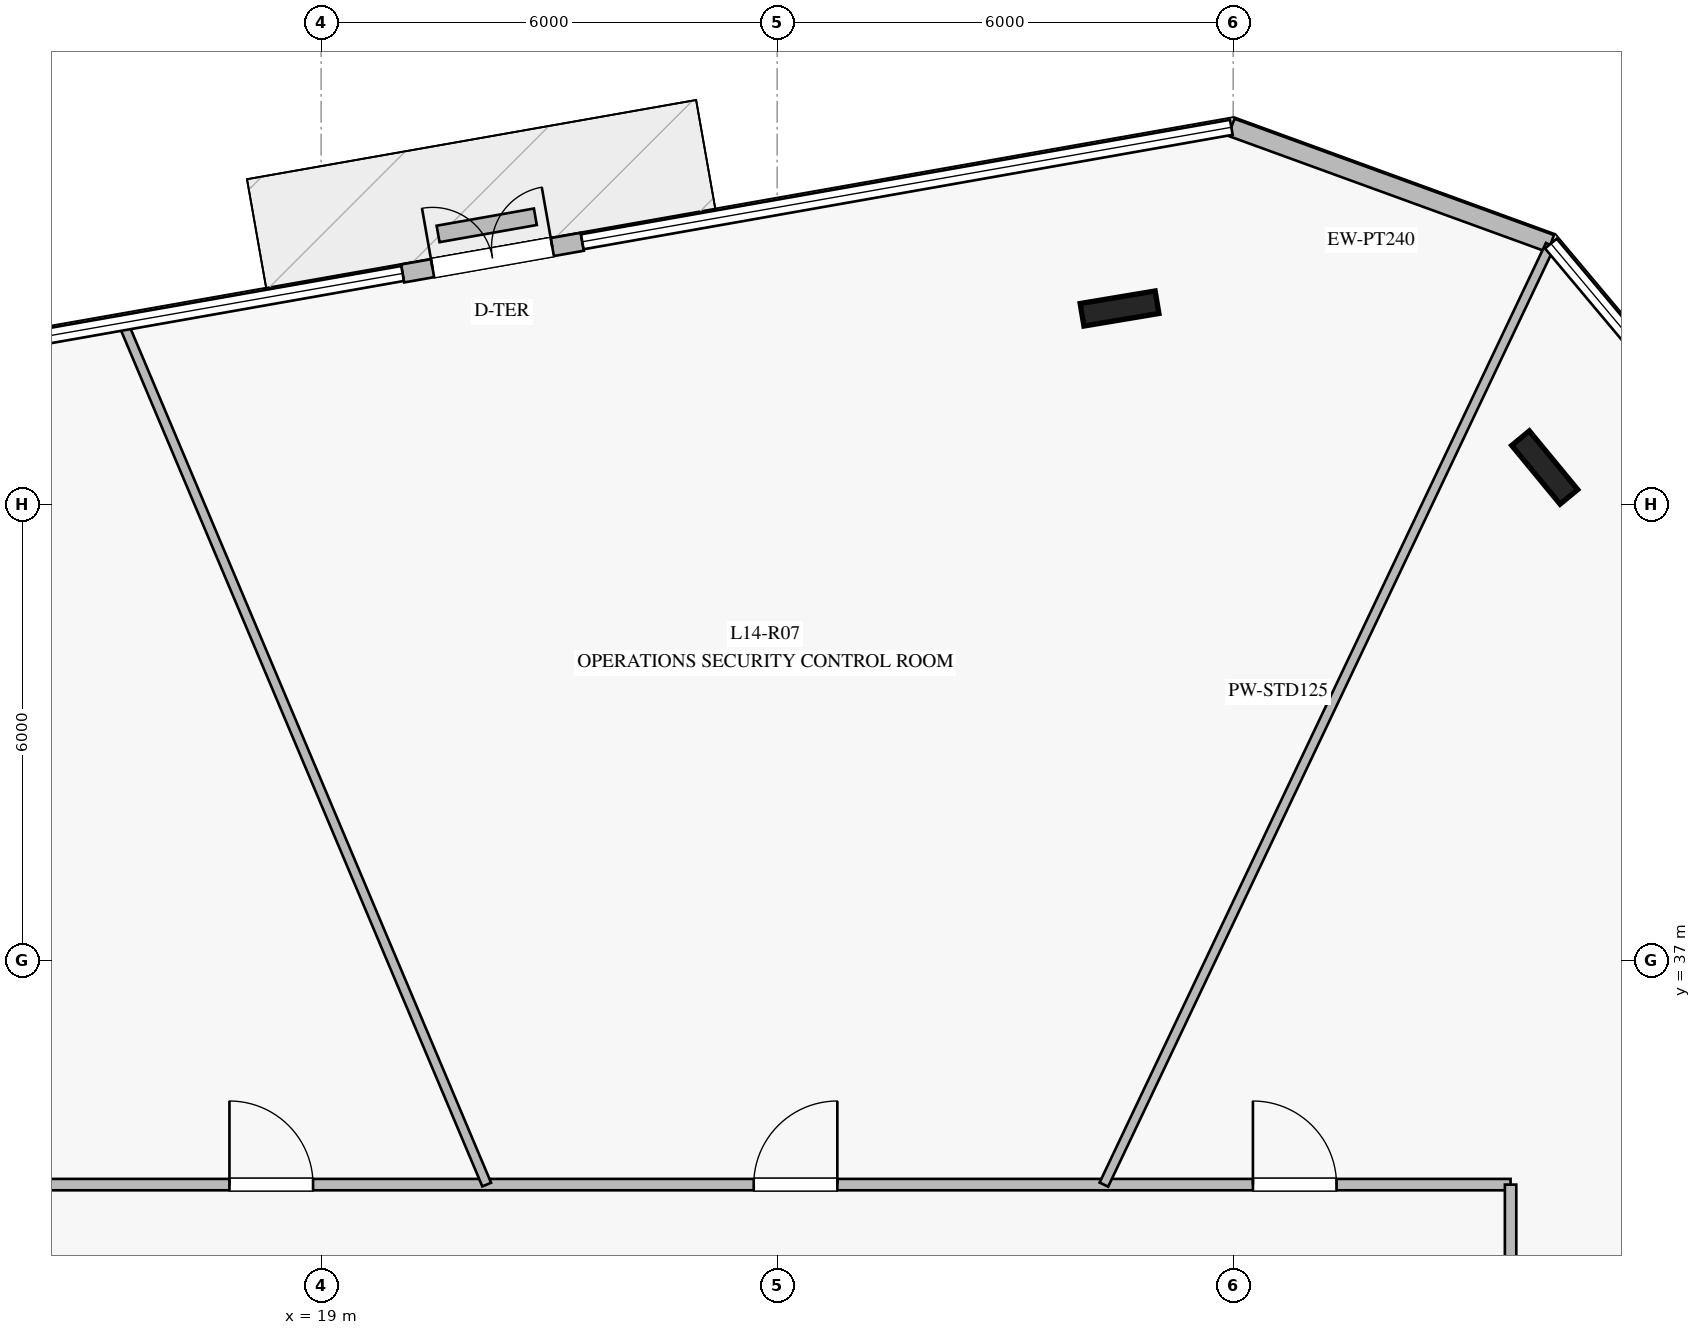
"""IFC4 building model, lengths in metres.
Left out: names, types, materials, properties, quantities, classifications, styles, units other than length and angle.
Written with IfcOpenShell. Run it as: python <this file> out.ifc"""

import sys

from ifc_helpers import new_model, si_unit, direction, frame, frame_2d, origin, origin_2d, place, context, subcontext, project, spatial, rectangle, i_section, extrude, element, fill, save


model = new_model("IFC4")
c1 = context("Model", 3, precision=1e-05, world=origin(), true_north=direction((0.0, 1.0)))
c2 = subcontext(c1, "Body", "Model", "MODEL_VIEW")
j1 = project(units=[si_unit("LENGTHUNIT", "METRE"), si_unit("PLANEANGLEUNIT", "RADIAN")], contexts=[c1])
p1 = place(None, origin())
s1 = spatial("IfcSite", under=j1, at=p1, CompositionType="ELEMENT")
p2 = place(p1, origin())
s2 = spatial("IfcBuilding", under=s1, at=p2, CompositionType="ELEMENT")
p3 = place(p2, frame((0.0, 0.0, 60.0)))
s3 = spatial("IfcBuildingStorey", under=s2, at=p3, CompositionType="ELEMENT", Elevation=60.0)
for number, where, z_axis, x_axis in (
    (1, (35.099, 43.484, 0.0), (0.0, 0.0, 1.0), (-0.636, 0.772, 0.0)),
    (2, (29.505, 45.576, 0.0), (0.0, 0.0, 1.0), (0.986, 0.165, 0.0)),
):
    element("IfcColumn", number, at=place(p3, frame(where, z_axis=z_axis, x_axis=x_axis)), inside=s3, PredefinedType="COLUMN", context=c2, shape_type="SweptSolid", body=[
        extrude(i_section(OverallWidth=0.3, OverallDepth=1.0, WebThickness=0.019, FlangeThickness=0.036, at=origin_2d()), origin(), (0.0, 0.0, 1.0), 4.0),
    ])
p4 = place(p3, frame((35.18, 46.43, 0.0), z_axis=(0.0, 0.0, 1.0), x_axis=(-0.939696189387, 0.342010338515, 0.0)))
e3 = element("IfcWall", 3, at=p4, inside=s3, PredefinedType="STANDARD", context=c2, shape_type="SweptSolid", body=[
    extrude(rectangle(XDim=4.474, YDim=0.24, at=frame_2d((2.237, 0.0))), origin(), (0.0, 0.0, 1.0), 3.76),
])
p5 = place(p3, frame((22.436, 46.454, 0.0), z_axis=(0.0, 0.0, 1.0), x_axis=(-0.984796866145, -0.173709908848, 0.0)))
e4 = element("IfcWall", 4, at=p5, inside=s3, PredefinedType="STANDARD", context=c2, shape_type="SweptSolid", body=[
    extrude(rectangle(XDim=2.4, YDim=0.24, at=frame_2d((1.2, 0.0))), origin(), (0.0, 0.0, 1.0), 3.76),
])
p6 = place(p5, frame((0.4, 0.0, 0.0)))
e5 = element("IfcOpeningElement", 5, at=p6, cuts=e4, PredefinedType="OPENING", context=c2, shape_type="SweptSolid", body=[
    extrude(rectangle(XDim=1.6, YDim=2.25, at=frame_2d((0.8, 1.125))), frame((0.0, 0.13, 0.0), z_axis=(0.0, -1.0, 0.0), x_axis=(1.0, 0.0, 0.0)), (0.0, 0.0, 1.0), 0.26),
])
p7 = place(p3, frame((21.819, 46.783, 0.0), z_axis=(0.0, 0.0, 1.0), x_axis=(-0.98475896803, -0.173924624146, 0.0)))
e6 = element("IfcWall", 6, at=p7, inside=s3, PredefinedType="USERDEFINED", context=c2, shape_type="SweptSolid", body=[
    extrude(rectangle(XDim=1.3, YDim=0.22, at=frame_2d((0.65, 0.0))), origin(), (0.0, 0.0, 1.0), 0.4),
])
p8 = place(p3, frame((15.35, 34.05, 0.0), z_axis=(0.0, 0.0, 1.0), x_axis=(1.0, 0.0, 0.0)))
e7 = element("IfcWall", 7, at=p8, inside=s3, PredefinedType="PARTITIONING", context=c2, shape_type="SweptSolid", body=[
    extrude(rectangle(XDim=19.3, YDim=0.15, at=frame_2d((9.65, 0.0))), origin(), (0.0, 0.0, 1.0), 3.21),
])
p9 = place(p8, frame((15.91, 0.0, 0.0)))
e8 = element("IfcOpeningElement", 8, at=p9, cuts=e7, PredefinedType="OPENING", context=c2, shape_type="SweptSolid", body=[
    extrude(rectangle(XDim=1.1, YDim=2.2, at=frame_2d((0.55, 1.1))), frame((0.0, 0.085, 0.0), z_axis=(0.0, -1.0, 0.0), x_axis=(1.0, 0.0, 0.0)), (0.0, 0.0, 1.0), 0.17),
])
p10 = place(p8, frame((9.342, 0.0, 0.0)))
e9 = element("IfcOpeningElement", 9, at=p10, cuts=e7, PredefinedType="OPENING", context=c2, shape_type="SweptSolid", body=[
    extrude(rectangle(XDim=1.1, YDim=2.2, at=frame_2d((0.55, 1.1))), frame((0.0, 0.085, 0.0), z_axis=(0.0, -1.0, 0.0), x_axis=(1.0, 0.0, 0.0)), (0.0, 0.0, 1.0), 0.17),
])
p11 = place(p8, frame((2.444, 0.0, 0.0)))
e10 = element("IfcOpeningElement", 10, at=p11, cuts=e7, PredefinedType="OPENING", context=c2, shape_type="SweptSolid", body=[
    extrude(rectangle(XDim=1.1, YDim=2.2, at=frame_2d((0.55, 1.1))), frame((0.0, 0.085, 0.0), z_axis=(0.0, -1.0, 0.0), x_axis=(1.0, 0.0, 0.0)), (0.0, 0.0, 1.0), 0.17),
])
p12 = place(p3, frame((34.65, 34.05, 0.0), z_axis=(0.0, 0.0, 1.0), x_axis=(0.0, -1.0, 0.0)))
e11 = element("IfcWall", 11, at=p12, inside=s3, PredefinedType="PARTITIONING", context=c2, shape_type="SweptSolid", body=[
    extrude(rectangle(XDim=18.1, YDim=0.15, at=frame_2d((9.05, 0.0))), origin(), (0.0, 0.0, 1.0), 3.21),
])
p13 = place(p12, frame((15.415, 0.0, 0.0)))
e12 = element("IfcOpeningElement", 12, at=p13, cuts=e11, PredefinedType="OPENING", context=c2, shape_type="SweptSolid", body=[
    extrude(rectangle(XDim=1.1, YDim=2.2, at=frame_2d((0.55, 1.1))), frame((0.0, 0.085, 0.0), z_axis=(0.0, -1.0, 0.0), x_axis=(1.0, 0.0, 0.0)), (0.0, 0.0, 1.0), 0.17),
])
p14 = place(p12, frame((9.732, 0.0, 0.0)))
e13 = element("IfcOpeningElement", 13, at=p14, cuts=e11, PredefinedType="OPENING", context=c2, shape_type="SweptSolid", body=[
    extrude(rectangle(XDim=1.1, YDim=2.2, at=frame_2d((0.55, 1.1))), frame((0.0, 0.085, 0.0), z_axis=(0.0, -1.0, 0.0), x_axis=(1.0, 0.0, 0.0)), (0.0, 0.0, 1.0), 0.17),
])
p15 = place(p3, frame((29.299, 34.05, 0.0), z_axis=(0.0, 0.0, 1.0), x_axis=(0.429120489577, 0.903247255974, 0.0)))
e14 = element("IfcWall", 14, at=p15, inside=s3, PredefinedType="PARTITIONING", context=c2, shape_type="SweptSolid", body=[
    extrude(rectangle(XDim=13.686, YDim=0.125, at=frame_2d((6.843, 0.0))), origin(), (0.0, 0.0, 1.0), 3.06),
])
p16 = place(p3, frame((21.179, 34.05, 0.0), z_axis=(0.0, 0.0, 1.0), x_axis=(-0.388906837938, 0.921277087203, 0.0)))
e15 = element("IfcWall", 15, at=p16, inside=s3, PredefinedType="PARTITIONING", context=c2, shape_type="SweptSolid", body=[
    extrude(rectangle(XDim=12.288, YDim=0.125, at=frame_2d((6.144, 0.0))), origin(), (0.0, 0.0, 1.0), 3.06),
])
p17 = place(p6, frame((1.6, 0.0, 0.0), z_axis=(0.0, 0.0, 1.0), x_axis=(-1.0, 0.0, 0.0)))
e16 = element("IfcDoor", 16, at=p17, inside=s3, OperationType="DOUBLE_DOOR_SINGLE_SWING", PredefinedType="DOOR", context=c2, shape_type="SweptSolid", body=[
    extrude(rectangle(XDim=1.6, YDim=2.25, at=frame_2d((0.8, 1.125))), frame((0.0, 0.025, 0.0), z_axis=(0.0, -1.0, 0.0), x_axis=(1.0, 0.0, 0.0)), (0.0, 0.0, 1.0), 0.05),
])
fill(e5, e16)
p18 = place(p9, origin())
e17 = element("IfcDoor", 17, at=p18, inside=s3, OperationType="SINGLE_SWING_LEFT", PredefinedType="DOOR", context=c2, shape_type="SweptSolid", body=[
    extrude(rectangle(XDim=1.1, YDim=2.2, at=frame_2d((0.55, 1.1))), frame((0.0, 0.025, 0.0), z_axis=(0.0, -1.0, 0.0), x_axis=(1.0, 0.0, 0.0)), (0.0, 0.0, 1.0), 0.05),
])
fill(e8, e17)
p19 = place(p10, origin())
e18 = element("IfcDoor", 18, at=p19, inside=s3, OperationType="SINGLE_SWING_RIGHT", PredefinedType="DOOR", context=c2, shape_type="SweptSolid", body=[
    extrude(rectangle(XDim=1.1, YDim=2.2, at=frame_2d((0.55, 1.1))), frame((0.0, 0.025, 0.0), z_axis=(0.0, -1.0, 0.0), x_axis=(1.0, 0.0, 0.0)), (0.0, 0.0, 1.0), 0.05),
])
fill(e9, e18)
p20 = place(p11, origin())
e19 = element("IfcDoor", 19, at=p20, inside=s3, OperationType="SINGLE_SWING_LEFT", PredefinedType="DOOR", context=c2, shape_type="SweptSolid", body=[
    extrude(rectangle(XDim=1.1, YDim=2.2, at=frame_2d((0.55, 1.1))), frame((0.0, 0.025, 0.0), z_axis=(0.0, -1.0, 0.0), x_axis=(1.0, 0.0, 0.0)), (0.0, 0.0, 1.0), 0.05),
])
fill(e10, e19)
save(model, sys.argv[1])
